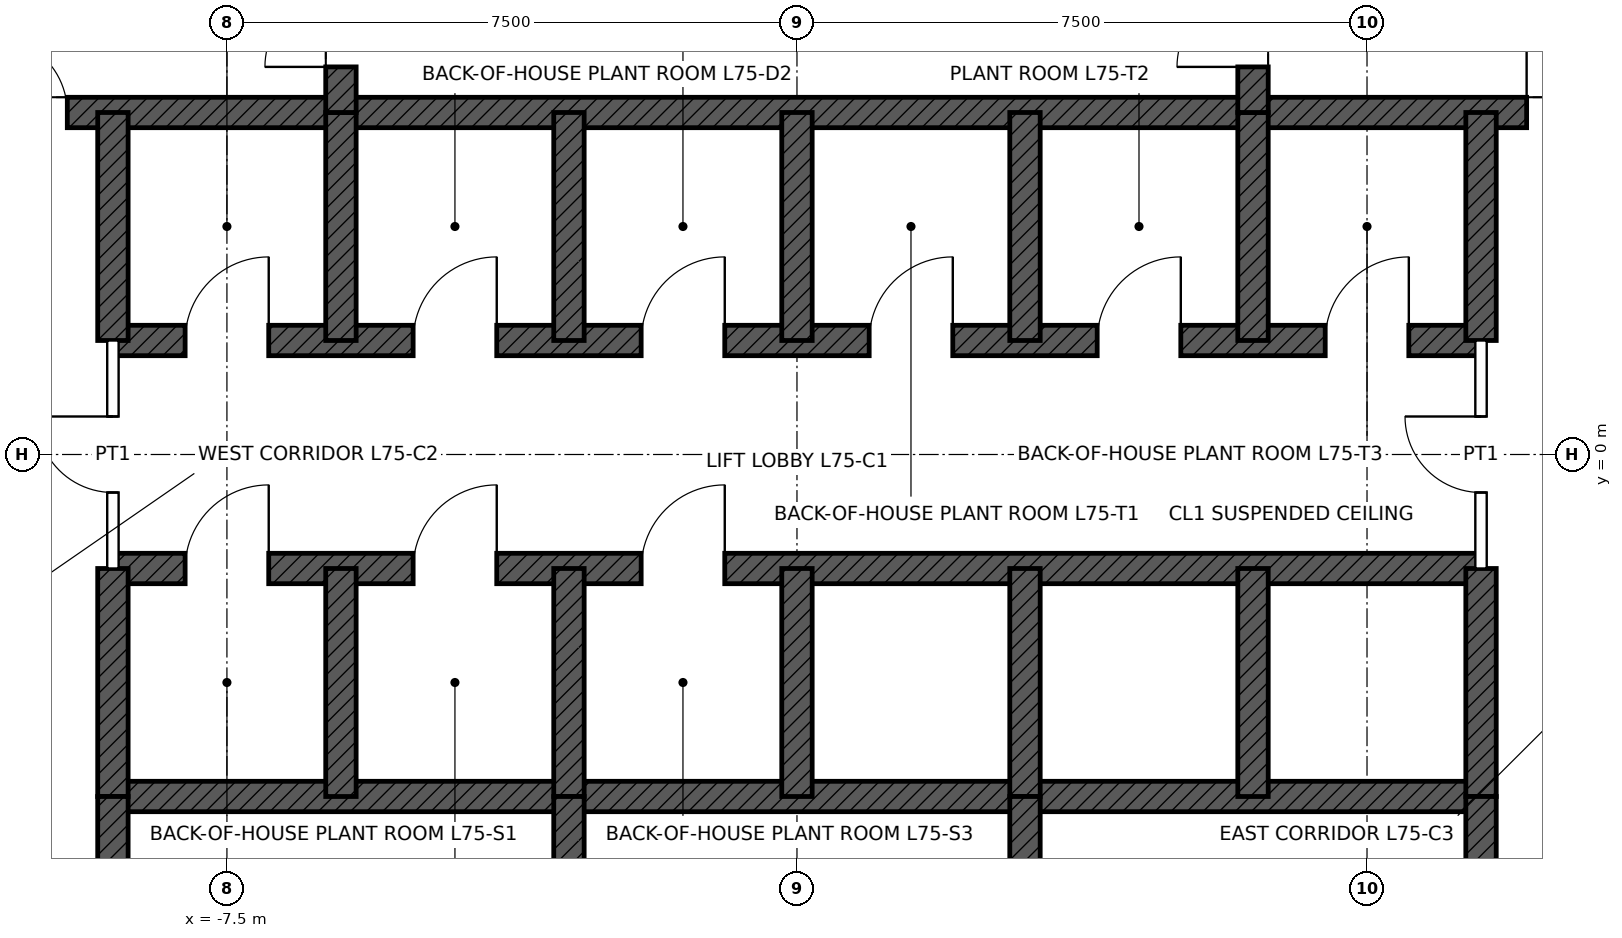
"""IFC4 building model, lengths in metres.
Left out: names, types, materials, properties, quantities, classifications, styles, units other than length and angle.
Written with IfcOpenShell. Run it as: python <this file> out.ifc"""

import sys

from ifc_helpers import new_model, si_unit, direction, frame, frame_2d, origin, place, context, subcontext, project, spatial, rectangle, extrude, element, fill, save


model = new_model("IFC4")
c1 = context("Model", 3, precision=1e-05, world=origin(), true_north=direction((0.0, 1.0)))
c2 = subcontext(c1, "Body", "Model", "MODEL_VIEW")
j1 = project(units=[si_unit("LENGTHUNIT", "METRE"), si_unit("PLANEANGLEUNIT", "RADIAN")], contexts=[c1])
p1 = place(None, origin())
s1 = spatial("IfcSite", under=j1, at=p1, CompositionType="ELEMENT")
p2 = place(p1, origin())
s2 = spatial("IfcBuilding", under=s1, at=p2, CompositionType="ELEMENT")
p3 = place(p2, frame((0.0, 0.0, 335.9)))
s3 = spatial("IfcBuildingStorey", under=s2, at=p3, CompositionType="ELEMENT", Elevation=335.9)
p4 = place(p3, frame((-11.0, 4.5, 0.0), z_axis=(0.0, 0.0, 1.0), x_axis=(1.0, 0.0, 0.0)))
e1 = element("IfcWall", 1, at=p4, inside=s3, PredefinedType="SHEAR", context=c2, shape_type="SweptSolid", body=[
    extrude(rectangle(XDim=22.0, YDim=0.4, at=frame_2d((11.0, 0.0))), origin(), (0.0, 0.0, 1.0), 6.0),
])
p5 = place(p4, frame((0.4, 0.0, 0.0)))
e2 = element("IfcOpeningElement", 2, at=p5, cuts=e1, PredefinedType="OPENING", context=c2, shape_type="SweptSolid", body=[
    extrude(rectangle(XDim=1.0, YDim=2.1, at=frame_2d((0.5, 1.05))), frame((0.0, 0.21, 0.0), z_axis=(0.0, -1.0, 0.0), x_axis=(1.0, 0.0, 0.0)), (0.0, 0.0, 1.0), 0.42),
])
p6 = place(p4, frame((20.6, 0.0, 0.0)))
e3 = element("IfcOpeningElement", 3, at=p6, cuts=e1, PredefinedType="OPENING", context=c2, shape_type="SweptSolid", body=[
    extrude(rectangle(XDim=1.0, YDim=2.1, at=frame_2d((0.5, 1.05))), frame((0.0, 0.21, 0.0), z_axis=(0.0, -1.0, 0.0), x_axis=(1.0, 0.0, 0.0)), (0.0, 0.0, 1.0), 0.42),
])
p7 = place(p3, frame((-9.0, 1.5, 0.0), z_axis=(0.0, 0.0, 1.0), x_axis=(1.0, 0.0, 0.0)))
e4 = element("IfcWall", 4, at=p7, inside=s3, PredefinedType="SHEAR", context=c2, shape_type="SweptSolid", body=[
    extrude(rectangle(XDim=18.0, YDim=0.4, at=frame_2d((9.0, 0.0))), origin(), (0.0, 0.0, 1.0), 6.0),
])
p8 = place(p7, frame((0.95, 0.0, 0.0)))
e5 = element("IfcOpeningElement", 5, at=p8, cuts=e4, PredefinedType="OPENING", context=c2, shape_type="SweptSolid", body=[
    extrude(rectangle(XDim=1.1, YDim=2.1, at=frame_2d((0.55, 1.05))), frame((0.0, 0.21, 0.0), z_axis=(0.0, -1.0, 0.0), x_axis=(1.0, 0.0, 0.0)), (0.0, 0.0, 1.0), 0.42),
])
p9 = place(p7, frame((3.95, 0.0, 0.0)))
e6 = element("IfcOpeningElement", 6, at=p9, cuts=e4, PredefinedType="OPENING", context=c2, shape_type="SweptSolid", body=[
    extrude(rectangle(XDim=1.1, YDim=2.1, at=frame_2d((0.55, 1.05))), frame((0.0, 0.21, 0.0), z_axis=(0.0, -1.0, 0.0), x_axis=(1.0, 0.0, 0.0)), (0.0, 0.0, 1.0), 0.42),
])
p10 = place(p7, frame((6.95, 0.0, 0.0)))
e7 = element("IfcOpeningElement", 7, at=p10, cuts=e4, PredefinedType="OPENING", context=c2, shape_type="SweptSolid", body=[
    extrude(rectangle(XDim=1.1, YDim=2.1, at=frame_2d((0.55, 1.05))), frame((0.0, 0.21, 0.0), z_axis=(0.0, -1.0, 0.0), x_axis=(1.0, 0.0, 0.0)), (0.0, 0.0, 1.0), 0.42),
])
p11 = place(p7, frame((9.95, 0.0, 0.0)))
e8 = element("IfcOpeningElement", 8, at=p11, cuts=e4, PredefinedType="OPENING", context=c2, shape_type="SweptSolid", body=[
    extrude(rectangle(XDim=1.1, YDim=2.1, at=frame_2d((0.55, 1.05))), frame((0.0, 0.21, 0.0), z_axis=(0.0, -1.0, 0.0), x_axis=(1.0, 0.0, 0.0)), (0.0, 0.0, 1.0), 0.42),
])
p12 = place(p7, frame((12.95, 0.0, 0.0)))
e9 = element("IfcOpeningElement", 9, at=p12, cuts=e4, PredefinedType="OPENING", context=c2, shape_type="SweptSolid", body=[
    extrude(rectangle(XDim=1.1, YDim=2.1, at=frame_2d((0.55, 1.05))), frame((0.0, 0.21, 0.0), z_axis=(0.0, -1.0, 0.0), x_axis=(1.0, 0.0, 0.0)), (0.0, 0.0, 1.0), 0.42),
])
p13 = place(p7, frame((15.95, 0.0, 0.0)))
e10 = element("IfcOpeningElement", 10, at=p13, cuts=e4, PredefinedType="OPENING", context=c2, shape_type="SweptSolid", body=[
    extrude(rectangle(XDim=1.1, YDim=2.1, at=frame_2d((0.55, 1.05))), frame((0.0, 0.21, 0.0), z_axis=(0.0, -1.0, 0.0), x_axis=(1.0, 0.0, 0.0)), (0.0, 0.0, 1.0), 0.42),
])
p14 = place(p3, frame((-9.0, -1.5, 0.0), z_axis=(0.0, 0.0, 1.0), x_axis=(1.0, 0.0, 0.0)))
e11 = element("IfcWall", 11, at=p14, inside=s3, PredefinedType="SHEAR", context=c2, shape_type="SweptSolid", body=[
    extrude(rectangle(XDim=18.0, YDim=0.4, at=frame_2d((9.0, 0.0))), origin(), (0.0, 0.0, 1.0), 6.0),
])
p15 = place(p14, frame((0.95, 0.0, 0.0)))
e12 = element("IfcOpeningElement", 12, at=p15, cuts=e11, PredefinedType="OPENING", context=c2, shape_type="SweptSolid", body=[
    extrude(rectangle(XDim=1.1, YDim=2.1, at=frame_2d((0.55, 1.05))), frame((0.0, 0.21, 0.0), z_axis=(0.0, -1.0, 0.0), x_axis=(1.0, 0.0, 0.0)), (0.0, 0.0, 1.0), 0.42),
])
p16 = place(p14, frame((3.95, 0.0, 0.0)))
e13 = element("IfcOpeningElement", 13, at=p16, cuts=e11, PredefinedType="OPENING", context=c2, shape_type="SweptSolid", body=[
    extrude(rectangle(XDim=1.1, YDim=2.1, at=frame_2d((0.55, 1.05))), frame((0.0, 0.21, 0.0), z_axis=(0.0, -1.0, 0.0), x_axis=(1.0, 0.0, 0.0)), (0.0, 0.0, 1.0), 0.42),
])
p17 = place(p14, frame((6.95, 0.0, 0.0)))
e14 = element("IfcOpeningElement", 14, at=p17, cuts=e11, PredefinedType="OPENING", context=c2, shape_type="SweptSolid", body=[
    extrude(rectangle(XDim=1.1, YDim=2.1, at=frame_2d((0.55, 1.05))), frame((0.0, 0.21, 0.0), z_axis=(0.0, -1.0, 0.0), x_axis=(1.0, 0.0, 0.0)), (0.0, 0.0, 1.0), 0.42),
])
p18 = place(p3, frame((-9.0, -4.5, 0.0), z_axis=(0.0, 0.0, 1.0), x_axis=(1.0, 0.0, 0.0)))
e15 = element("IfcWall", 15, at=p18, inside=s3, PredefinedType="SHEAR", context=c2, shape_type="SweptSolid", body=[
    extrude(rectangle(XDim=18.0, YDim=0.4, at=frame_2d((9.0, 0.0))), origin(), (0.0, 0.0, 1.0), 6.0),
])
for number, where, z_axis, x_axis in (
    (16, (-9.0, 1.5, 0.0), (0.0, 0.0, 1.0), (0.0, 1.0, 0.0)),
    (17, (9.0, 1.5, 0.0), (0.0, 0.0, 1.0), (0.0, 1.0, 0.0)),
    (18, (-9.0, -4.5, 0.0), (0.0, 0.0, 1.0), (0.0, 1.0, 0.0)),
    (19, (9.0, -4.5, 0.0), (0.0, 0.0, 1.0), (0.0, 1.0, 0.0)),
    (20, (-6.0, 1.5, 0.0), (0.0, 0.0, 1.0), (0.0, 1.0, 0.0)),
    (21, (-3.0, 1.5, 0.0), (0.0, 0.0, 1.0), (0.0, 1.0, 0.0)),
    (22, (0.0, 1.5, 0.0), (0.0, 0.0, 1.0), (0.0, 1.0, 0.0)),
    (23, (3.0, 1.5, 0.0), (0.0, 0.0, 1.0), (0.0, 1.0, 0.0)),
    (24, (6.0, 1.5, 0.0), (0.0, 0.0, 1.0), (0.0, 1.0, 0.0)),
    (25, (-6.0, -4.5, 0.0), (0.0, 0.0, 1.0), (0.0, 1.0, 0.0)),
    (26, (-3.0, -4.5, 0.0), (0.0, 0.0, 1.0), (0.0, 1.0, 0.0)),
    (27, (0.0, -4.5, 0.0), (0.0, 0.0, 1.0), (0.0, 1.0, 0.0)),
    (28, (3.0, -4.5, 0.0), (0.0, 0.0, 1.0), (0.0, 1.0, 0.0)),
    (29, (6.0, -4.5, 0.0), (0.0, 0.0, 1.0), (0.0, 1.0, 0.0)),
):
    element("IfcWall", number, at=place(p3, frame(where, z_axis=z_axis, x_axis=x_axis)), inside=s3, PredefinedType="SHEAR", context=c2, shape_type="SweptSolid", body=[
        extrude(rectangle(XDim=3.0, YDim=0.4, at=frame_2d((1.5, 0.0))), origin(), (0.0, 0.0, 1.0), 6.0),
    ])
p19 = place(p3, frame((-6.0, 4.5, 0.0), z_axis=(0.0, 0.0, 1.0), x_axis=(0.0, 1.0, 0.0)))
e30 = element("IfcWall", 30, at=p19, inside=s3, PredefinedType="SHEAR", context=c2, shape_type="SweptSolid", body=[
    extrude(rectangle(XDim=6.5, YDim=0.4, at=frame_2d((3.25, 0.0))), origin(), (0.0, 0.0, 1.0), 6.0),
])
p20 = place(p19, frame((0.6, 0.0, 0.0)))
e31 = element("IfcOpeningElement", 31, at=p20, cuts=e30, PredefinedType="OPENING", context=c2, shape_type="SweptSolid", body=[
    extrude(rectangle(XDim=1.0, YDim=2.1, at=frame_2d((0.5, 1.05))), frame((0.0, 0.21, 0.0), z_axis=(0.0, -1.0, 0.0), x_axis=(1.0, 0.0, 0.0)), (0.0, 0.0, 1.0), 0.42),
])
p21 = place(p3, frame((6.0, 4.5, 0.0), z_axis=(0.0, 0.0, 1.0), x_axis=(0.0, 1.0, 0.0)))
e32 = element("IfcWall", 32, at=p21, inside=s3, PredefinedType="SHEAR", context=c2, shape_type="SweptSolid", body=[
    extrude(rectangle(XDim=6.5, YDim=0.4, at=frame_2d((3.25, 0.0))), origin(), (0.0, 0.0, 1.0), 6.0),
])
p22 = place(p21, frame((0.6, 0.0, 0.0)))
e33 = element("IfcOpeningElement", 33, at=p22, cuts=e32, PredefinedType="OPENING", context=c2, shape_type="SweptSolid", body=[
    extrude(rectangle(XDim=1.0, YDim=2.1, at=frame_2d((0.5, 1.05))), frame((0.0, 0.21, 0.0), z_axis=(0.0, -1.0, 0.0), x_axis=(1.0, 0.0, 0.0)), (0.0, 0.0, 1.0), 0.42),
])
p23 = place(p3, frame((-9.0, -11.0, 0.0), z_axis=(0.0, 0.0, 1.0), x_axis=(0.0, 1.0, 0.0)))
e34 = element("IfcWall", 34, at=p23, inside=s3, PredefinedType="SHEAR", context=c2, shape_type="SweptSolid", body=[
    extrude(rectangle(XDim=6.5, YDim=0.4, at=frame_2d((3.25, 0.0))), origin(), (0.0, 0.0, 1.0), 6.0),
])
p24 = place(p23, frame((4.25, 0.0, 0.0)))
e35 = element("IfcOpeningElement", 35, at=p24, cuts=e34, PredefinedType="OPENING", context=c2, shape_type="SweptSolid", body=[
    extrude(rectangle(XDim=1.0, YDim=2.1, at=frame_2d((0.5, 1.05))), frame((0.0, 0.21, 0.0), z_axis=(0.0, -1.0, 0.0), x_axis=(1.0, 0.0, 0.0)), (0.0, 0.0, 1.0), 0.42),
])
p25 = place(p3, frame((9.0, -11.0, 0.0), z_axis=(0.0, 0.0, 1.0), x_axis=(0.0, 1.0, 0.0)))
e36 = element("IfcWall", 36, at=p25, inside=s3, PredefinedType="SHEAR", context=c2, shape_type="SweptSolid", body=[
    extrude(rectangle(XDim=6.5, YDim=0.4, at=frame_2d((3.25, 0.0))), origin(), (0.0, 0.0, 1.0), 6.0),
])
p26 = place(p25, frame((4.25, 0.0, 0.0)))
e37 = element("IfcOpeningElement", 37, at=p26, cuts=e36, PredefinedType="OPENING", context=c2, shape_type="SweptSolid", body=[
    extrude(rectangle(XDim=1.0, YDim=2.1, at=frame_2d((0.5, 1.05))), frame((0.0, 0.21, 0.0), z_axis=(0.0, -1.0, 0.0), x_axis=(1.0, 0.0, 0.0)), (0.0, 0.0, 1.0), 0.42),
])
for number, where, z_axis, x_axis in (
    (38, (-3.0, -11.0, 0.0), (0.0, 0.0, 1.0), (0.0, 1.0, 0.0)),
    (39, (3.0, -11.0, 0.0), (0.0, 0.0, 1.0), (0.0, 1.0, 0.0)),
):
    element("IfcWall", number, at=place(p3, frame(where, z_axis=z_axis, x_axis=x_axis)), inside=s3, PredefinedType="SHEAR", context=c2, shape_type="SweptSolid", body=[
        extrude(rectangle(XDim=6.5, YDim=0.4, at=frame_2d((3.25, 0.0))), origin(), (0.0, 0.0, 1.0), 6.0),
    ])
p27 = place(p3, frame((-9.0, -1.5, 0.0), z_axis=(0.0, 0.0, 1.0), x_axis=(0.0, 1.0, 0.0)))
e40 = element("IfcWall", 40, at=p27, inside=s3, PredefinedType="PARTITIONING", context=c2, shape_type="SweptSolid", body=[
    extrude(rectangle(XDim=3.0, YDim=0.15, at=frame_2d((1.5, 0.0))), origin(), (0.0, 0.0, 1.0), 5.75),
])
p28 = place(p27, frame((1.0, 0.0, 0.0)))
e41 = element("IfcOpeningElement", 41, at=p28, cuts=e40, PredefinedType="OPENING", context=c2, shape_type="SweptSolid", body=[
    extrude(rectangle(XDim=1.0, YDim=2.4, at=frame_2d((0.5, 1.2))), frame((0.0, 0.085, 0.0), z_axis=(0.0, -1.0, 0.0), x_axis=(1.0, 0.0, 0.0)), (0.0, 0.0, 1.0), 0.17),
])
p29 = place(p3, frame((9.0, -1.5, 0.0), z_axis=(0.0, 0.0, 1.0), x_axis=(0.0, 1.0, 0.0)))
e42 = element("IfcWall", 42, at=p29, inside=s3, PredefinedType="PARTITIONING", context=c2, shape_type="SweptSolid", body=[
    extrude(rectangle(XDim=3.0, YDim=0.15, at=frame_2d((1.5, 0.0))), origin(), (0.0, 0.0, 1.0), 5.75),
])
p30 = place(p29, frame((1.0, 0.0, 0.0)))
e43 = element("IfcOpeningElement", 43, at=p30, cuts=e42, PredefinedType="OPENING", context=c2, shape_type="SweptSolid", body=[
    extrude(rectangle(XDim=1.0, YDim=2.4, at=frame_2d((0.5, 1.2))), frame((0.0, 0.085, 0.0), z_axis=(0.0, -1.0, 0.0), x_axis=(1.0, 0.0, 0.0)), (0.0, 0.0, 1.0), 0.17),
])
p31 = place(p5, origin())
e44 = element("IfcDoor", 44, at=p31, inside=s3, OperationType="SINGLE_SWING_LEFT", PredefinedType="DOOR", context=c2, shape_type="SweptSolid", body=[
    extrude(rectangle(XDim=1.0, YDim=2.1, at=frame_2d((0.5, 1.05))), frame((0.0, 0.025, 0.0), z_axis=(0.0, -1.0, 0.0), x_axis=(1.0, 0.0, 0.0)), (0.0, 0.0, 1.0), 0.05),
])
fill(e2, e44)
p32 = place(p6, origin())
e45 = element("IfcDoor", 45, at=p32, inside=s3, OperationType="SINGLE_SWING_LEFT", PredefinedType="DOOR", context=c2, shape_type="SweptSolid", body=[
    extrude(rectangle(XDim=1.0, YDim=2.1, at=frame_2d((0.5, 1.05))), frame((0.0, 0.025, 0.0), z_axis=(0.0, -1.0, 0.0), x_axis=(1.0, 0.0, 0.0)), (0.0, 0.0, 1.0), 0.05),
])
fill(e3, e45)
p33 = place(p20, origin())
e46 = element("IfcDoor", 46, at=p33, inside=s3, OperationType="SINGLE_SWING_LEFT", PredefinedType="DOOR", context=c2, shape_type="SweptSolid", body=[
    extrude(rectangle(XDim=1.0, YDim=2.1, at=frame_2d((0.5, 1.05))), frame((0.0, 0.025, 0.0), z_axis=(0.0, -1.0, 0.0), x_axis=(1.0, 0.0, 0.0)), (0.0, 0.0, 1.0), 0.05),
])
fill(e31, e46)
p34 = place(p22, origin())
e47 = element("IfcDoor", 47, at=p34, inside=s3, OperationType="SINGLE_SWING_LEFT", PredefinedType="DOOR", context=c2, shape_type="SweptSolid", body=[
    extrude(rectangle(XDim=1.0, YDim=2.1, at=frame_2d((0.5, 1.05))), frame((0.0, 0.025, 0.0), z_axis=(0.0, -1.0, 0.0), x_axis=(1.0, 0.0, 0.0)), (0.0, 0.0, 1.0), 0.05),
])
fill(e33, e47)
p35 = place(p28, origin())
e48 = element("IfcDoor", 48, at=p35, inside=s3, OperationType="SINGLE_SWING_RIGHT", PredefinedType="DOOR", context=c2, shape_type="SweptSolid", body=[
    extrude(rectangle(XDim=1.0, YDim=2.4, at=frame_2d((0.5, 1.2))), frame((0.0, 0.025, 0.0), z_axis=(0.0, -1.0, 0.0), x_axis=(1.0, 0.0, 0.0)), (0.0, 0.0, 1.0), 0.05),
])
fill(e41, e48)
p36 = place(p30, origin())
e49 = element("IfcDoor", 49, at=p36, inside=s3, OperationType="SINGLE_SWING_RIGHT", PredefinedType="DOOR", context=c2, shape_type="SweptSolid", body=[
    extrude(rectangle(XDim=1.0, YDim=2.4, at=frame_2d((0.5, 1.2))), frame((0.0, 0.025, 0.0), z_axis=(0.0, -1.0, 0.0), x_axis=(1.0, 0.0, 0.0)), (0.0, 0.0, 1.0), 0.05),
])
fill(e43, e49)
p37 = place(p8, origin())
e50 = element("IfcDoor", 50, at=p37, inside=s3, OperationType="SINGLE_SWING_RIGHT", PredefinedType="DOOR", context=c2, shape_type="SweptSolid", body=[
    extrude(rectangle(XDim=1.1, YDim=2.1, at=frame_2d((0.55, 1.05))), frame((0.0, 0.025, 0.0), z_axis=(0.0, -1.0, 0.0), x_axis=(1.0, 0.0, 0.0)), (0.0, 0.0, 1.0), 0.05),
])
fill(e5, e50)
p38 = place(p9, origin())
e51 = element("IfcDoor", 51, at=p38, inside=s3, OperationType="SINGLE_SWING_RIGHT", PredefinedType="DOOR", context=c2, shape_type="SweptSolid", body=[
    extrude(rectangle(XDim=1.1, YDim=2.1, at=frame_2d((0.55, 1.05))), frame((0.0, 0.025, 0.0), z_axis=(0.0, -1.0, 0.0), x_axis=(1.0, 0.0, 0.0)), (0.0, 0.0, 1.0), 0.05),
])
fill(e6, e51)
p39 = place(p10, origin())
e52 = element("IfcDoor", 52, at=p39, inside=s3, OperationType="SINGLE_SWING_RIGHT", PredefinedType="DOOR", context=c2, shape_type="SweptSolid", body=[
    extrude(rectangle(XDim=1.1, YDim=2.1, at=frame_2d((0.55, 1.05))), frame((0.0, 0.025, 0.0), z_axis=(0.0, -1.0, 0.0), x_axis=(1.0, 0.0, 0.0)), (0.0, 0.0, 1.0), 0.05),
])
fill(e7, e52)
p40 = place(p11, origin())
e53 = element("IfcDoor", 53, at=p40, inside=s3, OperationType="SINGLE_SWING_RIGHT", PredefinedType="DOOR", context=c2, shape_type="SweptSolid", body=[
    extrude(rectangle(XDim=1.1, YDim=2.1, at=frame_2d((0.55, 1.05))), frame((0.0, 0.025, 0.0), z_axis=(0.0, -1.0, 0.0), x_axis=(1.0, 0.0, 0.0)), (0.0, 0.0, 1.0), 0.05),
])
fill(e8, e53)
p41 = place(p12, origin())
e54 = element("IfcDoor", 54, at=p41, inside=s3, OperationType="SINGLE_SWING_RIGHT", PredefinedType="DOOR", context=c2, shape_type="SweptSolid", body=[
    extrude(rectangle(XDim=1.1, YDim=2.1, at=frame_2d((0.55, 1.05))), frame((0.0, 0.025, 0.0), z_axis=(0.0, -1.0, 0.0), x_axis=(1.0, 0.0, 0.0)), (0.0, 0.0, 1.0), 0.05),
])
fill(e9, e54)
p42 = place(p13, origin())
e55 = element("IfcDoor", 55, at=p42, inside=s3, OperationType="SINGLE_SWING_RIGHT", PredefinedType="DOOR", context=c2, shape_type="SweptSolid", body=[
    extrude(rectangle(XDim=1.1, YDim=2.1, at=frame_2d((0.55, 1.05))), frame((0.0, 0.025, 0.0), z_axis=(0.0, -1.0, 0.0), x_axis=(1.0, 0.0, 0.0)), (0.0, 0.0, 1.0), 0.05),
])
fill(e10, e55)
p43 = place(p15, origin())
e56 = element("IfcDoor", 56, at=p43, inside=s3, OperationType="SINGLE_SWING_RIGHT", PredefinedType="DOOR", context=c2, shape_type="SweptSolid", body=[
    extrude(rectangle(XDim=1.1, YDim=2.1, at=frame_2d((0.55, 1.05))), frame((0.0, 0.025, 0.0), z_axis=(0.0, -1.0, 0.0), x_axis=(1.0, 0.0, 0.0)), (0.0, 0.0, 1.0), 0.05),
])
fill(e12, e56)
p44 = place(p16, origin())
e57 = element("IfcDoor", 57, at=p44, inside=s3, OperationType="SINGLE_SWING_RIGHT", PredefinedType="DOOR", context=c2, shape_type="SweptSolid", body=[
    extrude(rectangle(XDim=1.1, YDim=2.1, at=frame_2d((0.55, 1.05))), frame((0.0, 0.025, 0.0), z_axis=(0.0, -1.0, 0.0), x_axis=(1.0, 0.0, 0.0)), (0.0, 0.0, 1.0), 0.05),
])
fill(e13, e57)
p45 = place(p17, origin())
e58 = element("IfcDoor", 58, at=p45, inside=s3, OperationType="SINGLE_SWING_RIGHT", PredefinedType="DOOR", context=c2, shape_type="SweptSolid", body=[
    extrude(rectangle(XDim=1.1, YDim=2.1, at=frame_2d((0.55, 1.05))), frame((0.0, 0.025, 0.0), z_axis=(0.0, -1.0, 0.0), x_axis=(1.0, 0.0, 0.0)), (0.0, 0.0, 1.0), 0.05),
])
fill(e14, e58)
save(model, sys.argv[1])
